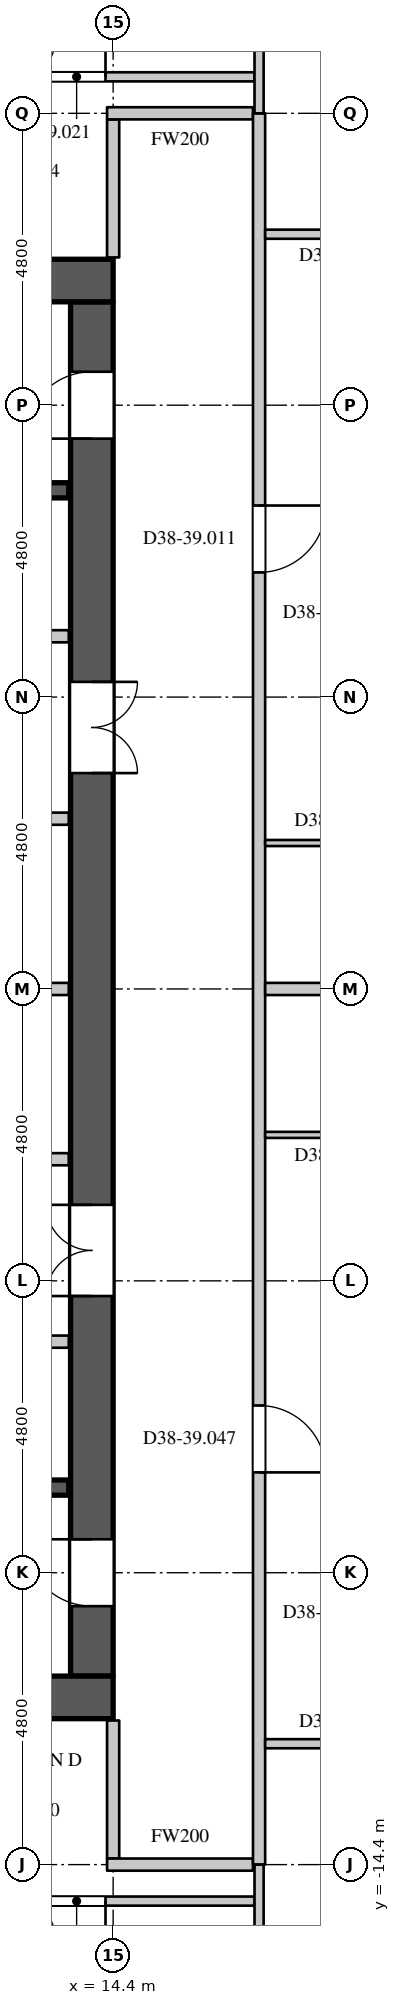
"""IFC4 building model, lengths in metres.
Left out: names, types, materials, properties, quantities, classifications, styles, units other than length and angle.
Written with IfcOpenShell. Run it as: python <this file> out.ifc"""

import sys

from ifc_helpers import new_model, si_unit, direction, frame, frame_2d, origin, place, context, subcontext, project, spatial, rectangle, extrude, element, fill, save


model = new_model("IFC4")
c1 = context("Model", 3, precision=1e-05, world=origin(), true_north=direction((0.0, 1.0)))
c2 = subcontext(c1, "Body", "Model", "MODEL_VIEW")
j1 = project(units=[si_unit("LENGTHUNIT", "METRE"), si_unit("PLANEANGLEUNIT", "RADIAN")], contexts=[c1])
p1 = place(None, origin())
s1 = spatial("IfcSite", under=j1, at=p1, CompositionType="ELEMENT")
p2 = place(p1, origin())
s2 = spatial("IfcBuilding", under=s1, at=p2, CompositionType="ELEMENT")
p3 = place(p2, frame((0.0, 0.0, 166.5)))
s3 = spatial("IfcBuildingStorey", under=s2, at=p3, CompositionType="ELEMENT", Elevation=166.5)
for number, where, z_axis, x_axis in (
    (1, (-14.4, 11.65, 0.0), (0.0, 0.0, 1.0), (1.0, 0.0, 0.0)),
    (2, (-14.4, -11.65, 0.0), (0.0, 0.0, 1.0), (1.0, 0.0, 0.0)),
):
    element("IfcWall", number, at=place(p3, frame(where, z_axis=z_axis, x_axis=x_axis)), inside=s3, PredefinedType="SHEAR", context=c2, shape_type="SweptSolid", body=[
        extrude(rectangle(XDim=28.8, YDim=0.7, at=frame_2d((14.4, 0.0))), origin(), (0.0, 0.0, 1.0), 4.2),
    ])
p4 = place(p3, frame((14.05, -11.3, 0.0), z_axis=(0.0, 0.0, 1.0), x_axis=(0.0, 1.0, 0.0)))
e3 = element("IfcWall", 3, at=p4, inside=s3, PredefinedType="SHEAR", context=c2, shape_type="SweptSolid", body=[
    extrude(rectangle(XDim=22.6, YDim=0.7, at=frame_2d((11.3, 0.0))), origin(), (0.0, 0.0, 1.0), 4.2),
])
p5 = place(p4, frame((20.35, 0.0, 0.0)))
e4 = element("IfcOpeningElement", 4, at=p5, cuts=e3, PredefinedType="OPENING", context=c2, shape_type="SweptSolid", body=[
    extrude(rectangle(XDim=1.1, YDim=2.2, at=frame_2d((0.55, 1.1))), frame((0.0, 0.36, 0.0), z_axis=(0.0, -1.0, 0.0), x_axis=(1.0, 0.0, 0.0)), (0.0, 0.0, 1.0), 0.72),
])
p6 = place(p4, frame((1.15, 0.0, 0.0)))
e5 = element("IfcOpeningElement", 5, at=p6, cuts=e3, PredefinedType="OPENING", context=c2, shape_type="SweptSolid", body=[
    extrude(rectangle(XDim=1.1, YDim=2.2, at=frame_2d((0.55, 1.1))), frame((0.0, 0.36, 0.0), z_axis=(0.0, -1.0, 0.0), x_axis=(1.0, 0.0, 0.0)), (0.0, 0.0, 1.0), 0.72),
])
p7 = place(p4, frame((14.85, 0.0, 0.0)))
e6 = element("IfcOpeningElement", 6, at=p7, cuts=e3, PredefinedType="OPENING", context=c2, shape_type="SweptSolid", body=[
    extrude(rectangle(XDim=1.5, YDim=2.4, at=frame_2d((0.75, 1.2))), frame((0.0, 0.36, 0.0), z_axis=(0.0, -1.0, 0.0), x_axis=(1.0, 0.0, 0.0)), (0.0, 0.0, 1.0), 0.72),
])
p8 = place(p4, frame((6.25, 0.0, 0.0)))
e7 = element("IfcOpeningElement", 7, at=p8, cuts=e3, PredefinedType="OPENING", context=c2, shape_type="SweptSolid", body=[
    extrude(rectangle(XDim=1.5, YDim=2.4, at=frame_2d((0.75, 1.2))), frame((0.0, 0.36, 0.0), z_axis=(0.0, -1.0, 0.0), x_axis=(1.0, 0.0, 0.0)), (0.0, 0.0, 1.0), 0.72),
])
p9 = place(p3, frame((-2.22, -5.8, 0.0), z_axis=(0.0, 0.0, 1.0), x_axis=(1.0, 0.0, 0.0)))
e8 = element("IfcWall", 8, at=p9, inside=s3, PredefinedType="PARTITIONING", context=c2, shape_type="SweptSolid", body=[
    extrude(rectangle(XDim=15.89, YDim=0.2, at=frame_2d((7.945, 0.0))), origin(), (0.0, 0.0, 1.0), 3.95),
])
p10 = place(p9, frame((3.15, 0.0, 0.0)))
e9 = element("IfcOpeningElement", 9, at=p10, cuts=e8, PredefinedType="OPENING", context=c2, shape_type="SweptSolid", body=[
    extrude(rectangle(XDim=0.9, YDim=2.2, at=frame_2d((0.45, 1.1))), frame((0.0, 0.11, 0.0), z_axis=(0.0, -1.0, 0.0), x_axis=(1.0, 0.0, 0.0)), (0.0, 0.0, 1.0), 0.22),
])
p11 = place(p9, frame((8.5, 0.0, 0.0)))
e10 = element("IfcOpeningElement", 10, at=p11, cuts=e8, PredefinedType="OPENING", context=c2, shape_type="SweptSolid", body=[
    extrude(rectangle(XDim=0.9, YDim=2.2, at=frame_2d((0.45, 1.1))), frame((0.0, 0.11, 0.0), z_axis=(0.0, -1.0, 0.0), x_axis=(1.0, 0.0, 0.0)), (0.0, 0.0, 1.0), 0.22),
])
p12 = place(p9, frame((12.8, 0.0, 0.0)))
e11 = element("IfcOpeningElement", 11, at=p12, cuts=e8, PredefinedType="OPENING", context=c2, shape_type="SweptSolid", body=[
    extrude(rectangle(XDim=0.9, YDim=2.2, at=frame_2d((0.45, 1.1))), frame((0.0, 0.11, 0.0), z_axis=(0.0, -1.0, 0.0), x_axis=(1.0, 0.0, 0.0)), (0.0, 0.0, 1.0), 0.22),
])
p13 = place(p3, frame((14.4, -14.3, 0.0), z_axis=(0.0, 0.0, 1.0), x_axis=(0.0, 1.0, 0.0)))
e12 = element("IfcWall", 12, at=p13, inside=s3, PredefinedType="PARTITIONING", context=c2, shape_type="SweptSolid", body=[
    extrude(rectangle(XDim=2.27, YDim=0.2, at=frame_2d((1.135, 0.0))), origin(), (0.0, 0.0, 1.0), 3.95),
])
p14 = place(p3, frame((14.3, -14.4, 0.0), z_axis=(0.0, 0.0, 1.0), x_axis=(1.0, 0.0, 0.0)))
e13 = element("IfcWall", 13, at=p14, inside=s3, PredefinedType="PARTITIONING", context=c2, shape_type="SweptSolid", body=[
    extrude(rectangle(XDim=2.4, YDim=0.2, at=frame_2d((1.2, 0.0))), origin(), (0.0, 0.0, 1.0), 3.95),
])
p15 = place(p3, frame((14.4, 12.03, 0.0), z_axis=(0.0, 0.0, 1.0), x_axis=(0.0, 1.0, 0.0)))
e14 = element("IfcWall", 14, at=p15, inside=s3, PredefinedType="PARTITIONING", context=c2, shape_type="SweptSolid", body=[
    extrude(rectangle(XDim=2.27, YDim=0.2, at=frame_2d((1.135, 0.0))), origin(), (0.0, 0.0, 1.0), 3.95),
])
p16 = place(p3, frame((14.3, 14.4, 0.0), z_axis=(0.0, 0.0, 1.0), x_axis=(1.0, 0.0, 0.0)))
e15 = element("IfcWall", 15, at=p16, inside=s3, PredefinedType="PARTITIONING", context=c2, shape_type="SweptSolid", body=[
    extrude(rectangle(XDim=2.4, YDim=0.2, at=frame_2d((1.2, 0.0))), origin(), (0.0, 0.0, 1.0), 3.95),
])
p17 = place(p3, frame((16.8, -14.4, 0.0), z_axis=(0.0, 0.0, 1.0), x_axis=(0.0, 1.0, 0.0)))
e16 = element("IfcWall", 16, at=p17, inside=s3, PredefinedType="PARTITIONING", context=c2, shape_type="SweptSolid", body=[
    extrude(rectangle(XDim=28.8, YDim=0.2, at=frame_2d((14.4, 0.0))), origin(), (0.0, 0.0, 1.0), 3.95),
])
p18 = place(p17, frame((21.25, 0.0, 0.0)))
e17 = element("IfcOpeningElement", 17, at=p18, cuts=e16, PredefinedType="OPENING", context=c2, shape_type="SweptSolid", body=[
    extrude(rectangle(XDim=1.1, YDim=2.4, at=frame_2d((0.55, 1.2))), frame((0.0, 0.11, 0.0), z_axis=(0.0, -1.0, 0.0), x_axis=(1.0, 0.0, 0.0)), (0.0, 0.0, 1.0), 0.22),
])
p19 = place(p17, frame((6.45, 0.0, 0.0)))
e18 = element("IfcOpeningElement", 18, at=p19, cuts=e16, PredefinedType="OPENING", context=c2, shape_type="SweptSolid", body=[
    extrude(rectangle(XDim=1.1, YDim=2.4, at=frame_2d((0.55, 1.2))), frame((0.0, 0.11, 0.0), z_axis=(0.0, -1.0, 0.0), x_axis=(1.0, 0.0, 0.0)), (0.0, 0.0, 1.0), 0.22),
])
p20 = place(p3, frame((11.675, -15.0, 0.0), z_axis=(0.0, 0.0, 1.0), x_axis=(1.0, 0.0, 0.0)))
e19 = element("IfcWall", 19, at=p20, inside=s3, PredefinedType="PARTITIONING", context=c2, shape_type="SweptSolid", body=[
    extrude(rectangle(XDim=5.051, YDim=0.15, at=frame_2d((2.525, 0.0))), origin(), (0.0, 0.0, 1.0), 3.95),
])
p21 = place(p20, frame((1.65, 0.0, 0.0)))
e20 = element("IfcOpeningElement", 20, at=p21, cuts=e19, PredefinedType="OPENING", context=c2, shape_type="SweptSolid", body=[
    extrude(rectangle(XDim=0.95, YDim=2.2, at=frame_2d((0.475, 1.1))), frame((0.0, 0.085, 0.0), z_axis=(0.0, -1.0, 0.0), x_axis=(1.0, 0.0, 0.0)), (0.0, 0.0, 1.0), 0.17),
])
p22 = place(p3, frame((11.675, 15.0, 0.0), z_axis=(0.0, 0.0, 1.0), x_axis=(1.0, 0.0, 0.0)))
e21 = element("IfcWall", 21, at=p22, inside=s3, PredefinedType="PARTITIONING", context=c2, shape_type="SweptSolid", body=[
    extrude(rectangle(XDim=5.051, YDim=0.15, at=frame_2d((2.525, 0.0))), origin(), (0.0, 0.0, 1.0), 3.95),
])
p23 = place(p22, frame((1.65, 0.0, 0.0)))
e22 = element("IfcOpeningElement", 22, at=p23, cuts=e21, PredefinedType="OPENING", context=c2, shape_type="SweptSolid", body=[
    extrude(rectangle(XDim=0.95, YDim=2.2, at=frame_2d((0.475, 1.1))), frame((0.0, 0.085, 0.0), z_axis=(0.0, -1.0, 0.0), x_axis=(1.0, 0.0, 0.0)), (0.0, 0.0, 1.0), 0.17),
])
p24 = place(p3, frame((16.8, -18.131, 0.0), z_axis=(0.0, 0.0, 1.0), x_axis=(0.0, 1.0, 0.0)))
e23 = element("IfcWall", 23, at=p24, inside=s3, PredefinedType="PARTITIONING", context=c2, shape_type="SweptSolid", body=[
    extrude(rectangle(XDim=3.731, YDim=0.15, at=frame_2d((1.865, 0.0))), origin(), (0.0, 0.0, 1.0), 3.95),
])
p25 = place(p24, frame((1.15, 0.0, 0.0)))
e24 = element("IfcOpeningElement", 24, at=p25, cuts=e23, PredefinedType="OPENING", context=c2, shape_type="SweptSolid", body=[
    extrude(rectangle(XDim=0.95, YDim=2.2, at=frame_2d((0.475, 1.1))), frame((0.0, 0.085, 0.0), z_axis=(0.0, -1.0, 0.0), x_axis=(1.0, 0.0, 0.0)), (0.0, 0.0, 1.0), 0.17),
])
p26 = place(p3, frame((16.9, -12.412, 0.0), z_axis=(0.0, 0.0, 1.0), x_axis=(1.0, 0.0, 0.0)))
e25 = element("IfcWall", 25, at=p26, inside=s3, PredefinedType="PARTITIONING", context=c2, shape_type="SweptSolid", body=[
    extrude(rectangle(XDim=5.638, YDim=0.15, at=frame_2d((2.819, 0.0))), origin(), (0.0, 0.0, 1.0), 3.95),
])
p27 = place(p26, frame((1.2, 0.0, 0.0)))
e26 = element("IfcOpeningElement", 26, at=p27, cuts=e25, PredefinedType="OPENING", context=c2, shape_type="SweptSolid", body=[
    extrude(rectangle(XDim=0.95, YDim=2.2, at=frame_2d((0.475, 1.1))), frame((0.0, 0.085, 0.0), z_axis=(0.0, -1.0, 0.0), x_axis=(1.0, 0.0, 0.0)), (0.0, 0.0, 1.0), 0.17),
])
p28 = place(p3, frame((16.9, 12.412, 0.0), z_axis=(0.0, 0.0, 1.0), x_axis=(1.0, 0.0, 0.0)))
e27 = element("IfcWall", 27, at=p28, inside=s3, PredefinedType="PARTITIONING", context=c2, shape_type="SweptSolid", body=[
    extrude(rectangle(XDim=5.638, YDim=0.15, at=frame_2d((2.819, 0.0))), origin(), (0.0, 0.0, 1.0), 3.95),
])
p29 = place(p28, frame((1.2, 0.0, 0.0)))
e28 = element("IfcOpeningElement", 28, at=p29, cuts=e27, PredefinedType="OPENING", context=c2, shape_type="SweptSolid", body=[
    extrude(rectangle(XDim=0.95, YDim=2.2, at=frame_2d((0.475, 1.1))), frame((0.0, 0.085, 0.0), z_axis=(0.0, -1.0, 0.0), x_axis=(1.0, 0.0, 0.0)), (0.0, 0.0, 1.0), 0.17),
])
p30 = place(p3, frame((16.8, 14.4, 0.0), z_axis=(0.0, 0.0, 1.0), x_axis=(0.0, 1.0, 0.0)))
e29 = element("IfcWall", 29, at=p30, inside=s3, PredefinedType="PARTITIONING", context=c2, shape_type="SweptSolid", body=[
    extrude(rectangle(XDim=3.731, YDim=0.15, at=frame_2d((1.865, 0.0))), origin(), (0.0, 0.0, 1.0), 3.95),
])
p31 = place(p30, frame((1.6, 0.0, 0.0)))
e30 = element("IfcOpeningElement", 30, at=p31, cuts=e29, PredefinedType="OPENING", context=c2, shape_type="SweptSolid", body=[
    extrude(rectangle(XDim=0.95, YDim=2.2, at=frame_2d((0.475, 1.1))), frame((0.0, 0.085, 0.0), z_axis=(0.0, -1.0, 0.0), x_axis=(1.0, 0.0, 0.0)), (0.0, 0.0, 1.0), 0.17),
])
p32 = place(p3, frame((16.9, 0.0, 0.0), z_axis=(0.0, 0.0, 1.0), x_axis=(1.0, 0.0, 0.0)))
e31 = element("IfcWall", 31, at=p32, inside=s3, PredefinedType="PARTITIONING", context=c2, shape_type="SweptSolid", body=[
    extrude(rectangle(XDim=7.155, YDim=0.2, at=frame_2d((3.578, 0.0))), origin(), (0.0, 0.0, 1.0), 3.95),
])
p33 = place(p3, frame((7.8, -2.8, 0.0), z_axis=(0.0, 0.0, 1.0), x_axis=(1.0, 0.0, 0.0)))
e32 = element("IfcWall", 32, at=p33, inside=s3, PredefinedType="PARTITIONING", context=c2, shape_type="SweptSolid", body=[
    extrude(rectangle(XDim=5.87, YDim=0.2, at=frame_2d((2.935, 0.0))), origin(), (0.0, 0.0, 1.0), 3.95),
])
p34 = place(p33, frame((2.5, 0.0, 0.0)))
e33 = element("IfcOpeningElement", 33, at=p34, cuts=e32, PredefinedType="OPENING", context=c2, shape_type="SweptSolid", body=[
    extrude(rectangle(XDim=0.9, YDim=2.2, at=frame_2d((0.45, 1.1))), frame((0.0, 0.11, 0.0), z_axis=(0.0, -1.0, 0.0), x_axis=(1.0, 0.0, 0.0)), (0.0, 0.0, 1.0), 0.22),
])
p35 = place(p3, frame((7.8, 0.0, 0.0), z_axis=(0.0, 0.0, 1.0), x_axis=(1.0, 0.0, 0.0)))
e34 = element("IfcWall", 34, at=p35, inside=s3, PredefinedType="PARTITIONING", context=c2, shape_type="SweptSolid", body=[
    extrude(rectangle(XDim=5.87, YDim=0.2, at=frame_2d((2.935, 0.0))), origin(), (0.0, 0.0, 1.0), 3.95),
])
p36 = place(p3, frame((8.82, 5.8, 0.0), z_axis=(0.0, 0.0, 1.0), x_axis=(1.0, 0.0, 0.0)))
e35 = element("IfcWall", 35, at=p36, inside=s3, PredefinedType="PARTITIONING", context=c2, shape_type="SweptSolid", body=[
    extrude(rectangle(XDim=4.85, YDim=0.2, at=frame_2d((2.425, 0.0))), origin(), (0.0, 0.0, 1.0), 3.95),
])
p37 = place(p36, frame((2.0, 0.0, 0.0)))
e36 = element("IfcOpeningElement", 36, at=p37, cuts=e35, PredefinedType="OPENING", context=c2, shape_type="SweptSolid", body=[
    extrude(rectangle(XDim=0.9, YDim=2.2, at=frame_2d((0.45, 1.1))), frame((0.0, 0.11, 0.0), z_axis=(0.0, -1.0, 0.0), x_axis=(1.0, 0.0, 0.0)), (0.0, 0.0, 1.0), 0.22),
])
p38 = place(p3, frame((10.42, 2.8, 0.0), z_axis=(0.0, 0.0, 1.0), x_axis=(1.0, 0.0, 0.0)))
e37 = element("IfcWall", 37, at=p38, inside=s3, PredefinedType="PARTITIONING", context=c2, shape_type="SweptSolid", body=[
    extrude(rectangle(XDim=3.25, YDim=0.2, at=frame_2d((1.625, 0.0))), origin(), (0.0, 0.0, 1.0), 3.95),
])
p39 = place(p38, frame((1.3, 0.0, 0.0)))
e38 = element("IfcOpeningElement", 38, at=p39, cuts=e37, PredefinedType="OPENING", context=c2, shape_type="SweptSolid", body=[
    extrude(rectangle(XDim=0.6, YDim=2.0, at=frame_2d((0.3, 1.0))), frame((0.0, 0.11, 0.0), z_axis=(0.0, -1.0, 0.0), x_axis=(1.0, 0.0, 0.0)), (0.0, 0.0, 1.0), 0.22),
])
p40 = place(p3, frame((5.275, -8.2, 0.0), z_axis=(0.0, 0.0, 1.0), x_axis=(1.0, 0.0, 0.0)))
e39 = element("IfcWall", 39, at=p40, inside=s3, PredefinedType="SHEAR", context=c2, shape_type="SweptSolid", body=[
    extrude(rectangle(XDim=8.395, YDim=0.25, at=frame_2d((4.198, 0.0))), origin(), (0.0, 0.0, 1.0), 3.95),
])
p41 = place(p3, frame((5.525, 8.2, 0.0), z_axis=(0.0, 0.0, 1.0), x_axis=(1.0, 0.0, 0.0)))
e40 = element("IfcWall", 40, at=p41, inside=s3, PredefinedType="SHEAR", context=c2, shape_type="SweptSolid", body=[
    extrude(rectangle(XDim=8.145, YDim=0.25, at=frame_2d((4.073, 0.0))), origin(), (0.0, 0.0, 1.0), 3.95),
])
p42 = place(p3, frame((16.9, -2.4, 0.0), z_axis=(0.0, 0.0, 1.0), x_axis=(1.0, 0.0, 0.0)))
e41 = element("IfcWall", 41, at=p42, inside=s3, PredefinedType="PARTITIONING", context=c2, shape_type="SweptSolid", body=[
    extrude(rectangle(XDim=3.225, YDim=0.1, at=frame_2d((1.613, 0.0))), origin(), (0.0, 0.0, 1.0), 3.95),
])
p43 = place(p42, frame((1.15, 0.0, 0.0)))
e42 = element("IfcOpeningElement", 42, at=p43, cuts=e41, PredefinedType="OPENING", context=c2, shape_type="SweptSolid", body=[
    extrude(rectangle(XDim=0.9, YDim=2.2, at=frame_2d((0.45, 1.1))), frame((0.0, 0.06, 0.0), z_axis=(0.0, -1.0, 0.0), x_axis=(1.0, 0.0, 0.0)), (0.0, 0.0, 1.0), 0.12),
])
p44 = place(p3, frame((16.9, 2.4, 0.0), z_axis=(0.0, 0.0, 1.0), x_axis=(1.0, 0.0, 0.0)))
e43 = element("IfcWall", 43, at=p44, inside=s3, PredefinedType="PARTITIONING", context=c2, shape_type="SweptSolid", body=[
    extrude(rectangle(XDim=3.225, YDim=0.1, at=frame_2d((1.613, 0.0))), origin(), (0.0, 0.0, 1.0), 3.95),
])
p45 = place(p44, frame((1.15, 0.0, 0.0)))
e44 = element("IfcOpeningElement", 44, at=p45, cuts=e43, PredefinedType="OPENING", context=c2, shape_type="SweptSolid", body=[
    extrude(rectangle(XDim=0.9, YDim=2.2, at=frame_2d((0.45, 1.1))), frame((0.0, 0.06, 0.0), z_axis=(0.0, -1.0, 0.0), x_axis=(1.0, 0.0, 0.0)), (0.0, 0.0, 1.0), 0.12),
])
p46 = place(p5, origin())
e45 = element("IfcDoor", 45, at=p46, inside=s3, OperationType="SINGLE_SWING_LEFT", PredefinedType="DOOR", context=c2, shape_type="SweptSolid", body=[
    extrude(rectangle(XDim=1.1, YDim=2.2, at=frame_2d((0.55, 1.1))), frame((0.0, 0.345, 0.0), z_axis=(0.0, -1.0, 0.0), x_axis=(1.0, 0.0, 0.0)), (0.0, 0.0, 1.0), 0.05),
])
fill(e4, e45)
p47 = place(p6, origin())
e46 = element("IfcDoor", 46, at=p47, inside=s3, OperationType="SINGLE_SWING_RIGHT", PredefinedType="DOOR", context=c2, shape_type="SweptSolid", body=[
    extrude(rectangle(XDim=1.1, YDim=2.2, at=frame_2d((0.55, 1.1))), frame((0.0, 0.345, 0.0), z_axis=(0.0, -1.0, 0.0), x_axis=(1.0, 0.0, 0.0)), (0.0, 0.0, 1.0), 0.05),
])
fill(e5, e46)
p48 = place(p7, origin())
e47 = element("IfcDoor", 47, at=p48, inside=s3, OperationType="DOUBLE_DOOR_SINGLE_SWING", PredefinedType="DOOR", context=c2, shape_type="SweptSolid", body=[
    extrude(rectangle(XDim=1.5, YDim=2.4, at=frame_2d((0.75, 1.2))), frame((0.0, -0.295, 0.0), z_axis=(0.0, -1.0, 0.0), x_axis=(1.0, 0.0, 0.0)), (0.0, 0.0, 1.0), 0.05),
])
fill(e6, e47)
p49 = place(p8, origin())
e48 = element("IfcDoor", 48, at=p49, inside=s3, OperationType="DOUBLE_DOOR_SINGLE_SWING", PredefinedType="DOOR", context=c2, shape_type="SweptSolid", body=[
    extrude(rectangle(XDim=1.5, YDim=2.4, at=frame_2d((0.75, 1.2))), frame((0.0, 0.345, 0.0), z_axis=(0.0, -1.0, 0.0), x_axis=(1.0, 0.0, 0.0)), (0.0, 0.0, 1.0), 0.05),
])
fill(e7, e48)
p50 = place(p18, origin())
e49 = element("IfcDoor", 49, at=p50, inside=s3, OperationType="SINGLE_SWING_LEFT", PredefinedType="DOOR", context=c2, shape_type="SweptSolid", body=[
    extrude(rectangle(XDim=1.1, YDim=2.4, at=frame_2d((0.55, 1.2))), frame((0.0, 0.025, 0.0), z_axis=(0.0, -1.0, 0.0), x_axis=(1.0, 0.0, 0.0)), (0.0, 0.0, 1.0), 0.05),
])
fill(e17, e49)
p51 = place(p23, origin())
e50 = element("IfcDoor", 50, at=p51, inside=s3, OperationType="SINGLE_SWING_RIGHT", PredefinedType="DOOR", context=c2, shape_type="SweptSolid", body=[
    extrude(rectangle(XDim=0.95, YDim=2.2, at=frame_2d((0.475, 1.1))), frame((0.0, 0.025, 0.0), z_axis=(0.0, -1.0, 0.0), x_axis=(1.0, 0.0, 0.0)), (0.0, 0.0, 1.0), 0.05),
])
fill(e22, e50)
p52 = place(p19, origin())
e51 = element("IfcDoor", 51, at=p52, inside=s3, OperationType="SINGLE_SWING_RIGHT", PredefinedType="DOOR", context=c2, shape_type="SweptSolid", body=[
    extrude(rectangle(XDim=1.1, YDim=2.4, at=frame_2d((0.55, 1.2))), frame((0.0, 0.025, 0.0), z_axis=(0.0, -1.0, 0.0), x_axis=(1.0, 0.0, 0.0)), (0.0, 0.0, 1.0), 0.05),
])
fill(e18, e51)
p53 = place(p21, origin())
e52 = element("IfcDoor", 52, at=p53, inside=s3, OperationType="SINGLE_SWING_LEFT", PredefinedType="DOOR", context=c2, shape_type="SweptSolid", body=[
    extrude(rectangle(XDim=0.95, YDim=2.2, at=frame_2d((0.475, 1.1))), frame((0.0, 0.025, 0.0), z_axis=(0.0, -1.0, 0.0), x_axis=(1.0, 0.0, 0.0)), (0.0, 0.0, 1.0), 0.05),
])
fill(e20, e52)
save(model, sys.argv[1])
